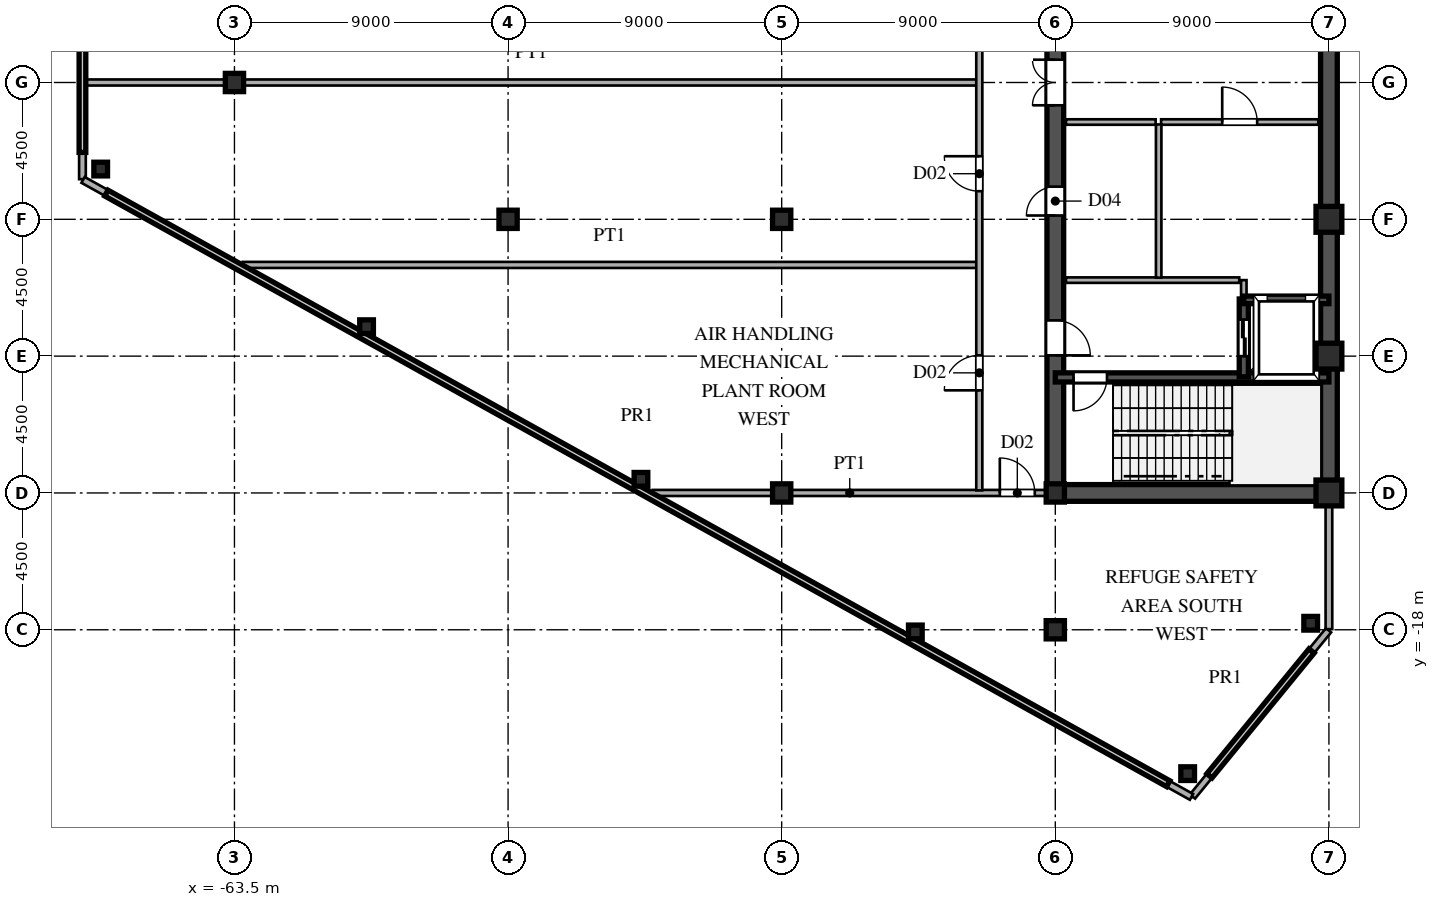
"""IFC4 building model, lengths in metres.
Left out: names, types, materials, properties, quantities, classifications, styles, units other than length and angle.
Written with IfcOpenShell. Run it as: python <this file> out.ifc"""

import sys

from ifc_helpers import new_model, si_unit, direction, frame, frame_2d, origin, origin_2d, place, context, subcontext, project, spatial, rectangle, hollow_rectangle, i_section, extrude, source, transform, mapped, element, fill, save


model = new_model("IFC4")
c1 = context("Model", 3, precision=1e-05, world=origin(), true_north=direction((0.0, 1.0)))
c2 = subcontext(c1, "Body", "Model", "MODEL_VIEW")
j1 = project(units=[si_unit("LENGTHUNIT", "METRE"), si_unit("PLANEANGLEUNIT", "RADIAN")], contexts=[c1])
p1 = place(None, origin())
s1 = spatial("IfcSite", under=j1, at=p1, CompositionType="ELEMENT")
p2 = place(p1, origin())
s2 = spatial("IfcBuilding", under=s1, at=p2, CompositionType="ELEMENT")
p3 = place(p2, frame((0.0, 0.0, 162.0)))
s3 = spatial("IfcBuildingStorey", under=s2, at=p3, CompositionType="ELEMENT", Elevation=162.0)
m1 = source(origin(), c2, "Body", "SweptSolid", [
    extrude(hollow_rectangle(XDim=0.85, YDim=0.85, WallThickness=0.036, at=origin_2d()), origin(), (0.0, 0.0, 1.0), 5.1),
])
for number, where, z_axis, x_axis in (
    (1, (-27.5, -13.5, 0.0), (0.0, 0.0, 1.0), (1.0, 0.0, 0.0)),
    (2, (-27.5, -9.0, 0.0), (0.0, 0.0, 1.0), (1.0, 0.0, 0.0)),
    (3, (-27.5, -4.5, 0.0), (0.0, 0.0, 1.0), (1.0, 0.0, 0.0)),
):
    element("IfcColumn", number, at=place(p3, frame(where, z_axis=z_axis, x_axis=x_axis)), inside=s3, PredefinedType="COLUMN", context=c2, shape_type="MappedRepresentation", body=[
        mapped(m1, transform((0.0, 0.0, 0.0), scale=1.0)),
    ])
m2 = source(origin(), c2, "Body", "SweptSolid", [
    extrude(i_section(OverallWidth=0.6, OverallDepth=0.6, WebThickness=0.025, FlangeThickness=0.04, at=origin_2d()), origin(), (0.0, 0.0, 1.0), 5.1),
])
for number, where, z_axis, x_axis in (
    (4, (-36.5, -18.0, 0.0), (0.0, 0.0, 1.0), (1.0, 0.0, 0.0)),
    (5, (-36.5, -13.5, 0.0), (0.0, 0.0, 1.0), (1.0, 0.0, 0.0)),
    (6, (-45.5, -13.5, 0.0), (0.0, 0.0, 1.0), (1.0, 0.0, 0.0)),
    (7, (-45.5, -4.5, 0.0), (0.0, 0.0, 1.0), (1.0, 0.0, 0.0)),
    (8, (-54.5, -4.5, 0.0), (0.0, 0.0, 1.0), (1.0, 0.0, 0.0)),
    (9, (-63.5, 0.0, 0.0), (0.0, 0.0, 1.0), (1.0, 0.0, 0.0)),
):
    element("IfcColumn", number, at=place(p3, frame(where, z_axis=z_axis, x_axis=x_axis)), inside=s3, PredefinedType="COLUMN", context=c2, shape_type="MappedRepresentation", body=[
        mapped(m2, transform((0.0, 0.0, 0.0), scale=1.0)),
    ])
m3 = source(origin(), c2, "Body", "SweptSolid", [
    extrude(hollow_rectangle(XDim=0.45, YDim=0.45, WallThickness=0.018, at=origin_2d()), origin(), (0.0, 0.0, 1.0), 5.1),
])
for number, where, z_axis, x_axis in (
    (10, (-28.1, -17.786, 0.0), (0.0, 0.0, 1.0), (1.0, 0.0, 0.0)),
    (11, (-67.9, -2.847, 0.0), (0.0, 0.0, 1.0), (1.0, 0.0, 0.0)),
    (12, (-32.147, -22.732, 0.0), (0.0, 0.0, 1.0), (1.0, 0.0, 0.0)),
    (13, (-41.104, -18.071, 0.0), (0.0, 0.0, 1.0), (1.0, 0.0, 0.0)),
    (14, (-50.129, -13.051, 0.0), (0.0, 0.0, 1.0), (1.0, 0.0, 0.0)),
    (15, (-59.155, -8.031, 0.0), (0.0, 0.0, 1.0), (1.0, 0.0, 0.0)),
):
    element("IfcColumn", number, at=place(p3, frame(where, z_axis=z_axis, x_axis=x_axis)), inside=s3, PredefinedType="COLUMN", context=c2, shape_type="MappedRepresentation", body=[
        mapped(m3, transform((0.0, 0.0, 0.0), scale=1.0)),
    ])
p4 = place(p3, frame((-27.5, -17.98, 0.0), z_axis=(0.0, 0.0, 1.0), x_axis=(0.0, 1.0, 0.0)))
e16 = element("IfcWall", 16, at=p4, inside=s3, PredefinedType="PARAPET", context=c2, shape_type="SweptSolid", body=[
    extrude(rectangle(XDim=4.46, YDim=0.22, at=frame_2d((2.23, 0.0))), origin(), (0.0, 0.0, 1.0), 1.25),
])
p5 = place(p3, frame((-68.5, 3.18, 0.0), z_axis=(0.0, 0.0, 1.0), x_axis=(0.0, -1.0, 0.0)))
e17 = element("IfcWall", 17, at=p5, inside=s3, PredefinedType="PARAPET", context=c2, shape_type="SweptSolid", body=[
    extrude(rectangle(XDim=6.36, YDim=0.22, at=frame_2d((3.18, 0.0))), origin(), (0.0, 0.0, 1.0), 1.25),
])
p6 = place(p3, frame((-68.482, -3.21, 0.0), z_axis=(0.0, 0.0, 1.0), x_axis=(0.873930586172, -0.486050748947, 0.0)))
e18 = element("IfcWall", 18, at=p6, inside=s3, PredefinedType="PARAPET", context=c2, shape_type="SweptSolid", body=[
    extrude(rectangle(XDim=41.725, YDim=0.22, at=frame_2d((20.863, 0.0))), origin(), (0.0, 0.0, 1.0), 1.25),
])
p7 = place(p3, frame((-31.987, -23.485, 0.0), z_axis=(0.0, 0.0, 1.0), x_axis=(0.633218976113, 0.773972692213, 0.0)))
e19 = element("IfcWall", 19, at=p7, inside=s3, PredefinedType="PARAPET", context=c2, shape_type="SweptSolid", body=[
    extrude(rectangle(XDim=7.066, YDim=0.22, at=frame_2d((3.533, 0.0))), origin(), (0.0, 0.0, 1.0), 1.25),
])
p8 = place(p3, frame((-27.5, -13.5, 0.0), z_axis=(0.0, 0.0, 1.0), x_axis=(0.0, 1.0, 0.0)))
e20 = element("IfcWall", 20, at=p8, inside=s3, PredefinedType="SHEAR", context=c2, shape_type="SweptSolid", body=[
    extrude(rectangle(XDim=12.2, YDim=0.55, at=frame_2d((6.1, 0.0))), origin(), (0.0, 0.0, 1.0), 4.88),
])
p9 = place(p3, frame((-27.5, -1.3, 0.0), z_axis=(0.0, 0.0, 1.0), x_axis=(0.0, 1.0, 0.0)))
e21 = element("IfcWall", 21, at=p9, inside=s3, PredefinedType="SHEAR", context=c2, shape_type="SweptSolid", body=[
    extrude(rectangle(XDim=2.6, YDim=0.55, at=frame_2d((1.3, 0.0))), origin(), (0.0, 0.0, 1.0), 4.88),
])
p10 = place(p3, frame((-36.5, -13.5, 0.0), z_axis=(0.0, 0.0, 1.0), x_axis=(1.0, 0.0, 0.0)))
e22 = element("IfcWall", 22, at=p10, inside=s3, PredefinedType="SHEAR", context=c2, shape_type="SweptSolid", body=[
    extrude(rectangle(XDim=9.0, YDim=0.55, at=frame_2d((4.5, 0.0))), origin(), (0.0, 0.0, 1.0), 4.88),
])
p11 = place(p3, frame((-36.5, -13.65, 0.0), z_axis=(0.0, 0.0, 1.0), x_axis=(0.0, 1.0, 0.0)))
e23 = element("IfcWall", 23, at=p11, inside=s3, PredefinedType="SHEAR", context=c2, shape_type="SweptSolid", body=[
    extrude(rectangle(XDim=7.15, YDim=0.55, at=frame_2d((3.575, 0.0))), origin(), (0.0, 0.0, 1.0), 4.88),
])
p12 = place(p11, frame((4.675, 0.0, 0.0)))
e24 = element("IfcOpeningElement", 24, at=p12, cuts=e23, PredefinedType="OPENING", context=c2, shape_type="SweptSolid", body=[
    extrude(rectangle(XDim=1.15, YDim=2.2, at=frame_2d((0.575, 1.1))), frame((0.0, 0.285, 0.0), z_axis=(0.0, -1.0, 0.0), x_axis=(1.0, 0.0, 0.0)), (0.0, 0.0, 1.0), 0.57),
])
p13 = place(p3, frame((-36.5, -1.3, 0.0), z_axis=(0.0, 0.0, 1.0), x_axis=(0.0, 1.0, 0.0)))
e25 = element("IfcWall", 25, at=p13, inside=s3, PredefinedType="SHEAR", context=c2, shape_type="SweptSolid", body=[
    extrude(rectangle(XDim=2.6, YDim=0.55, at=frame_2d((1.3, 0.0))), origin(), (0.0, 0.0, 1.0), 4.88),
])
p14 = place(p13, frame((0.55, 0.0, 0.0)))
e26 = element("IfcOpeningElement", 26, at=p14, cuts=e25, PredefinedType="OPENING", context=c2, shape_type="SweptSolid", body=[
    extrude(rectangle(XDim=1.5, YDim=2.3, at=frame_2d((0.75, 1.15))), frame((0.0, 0.285, 0.0), z_axis=(0.0, -1.0, 0.0), x_axis=(1.0, 0.0, 0.0)), (0.0, 0.0, 1.0), 0.57),
])
p15 = place(p3, frame((-36.5, -6.5, 0.0), z_axis=(0.0, 0.0, 1.0), x_axis=(0.0, 1.0, 0.0)))
e27 = element("IfcWall", 27, at=p15, inside=s3, PredefinedType="SHEAR", context=c2, shape_type="SweptSolid", body=[
    extrude(rectangle(XDim=5.2, YDim=0.55, at=frame_2d((2.6, 0.0))), origin(), (0.0, 0.0, 1.0), 4.88),
])
p16 = place(p15, frame((2.125, 0.0, 0.0)))
e28 = element("IfcOpeningElement", 28, at=p16, cuts=e27, PredefinedType="OPENING", context=c2, shape_type="SweptSolid", body=[
    extrude(rectangle(XDim=0.95, YDim=2.15, at=frame_2d((0.475, 1.075))), frame((0.0, 0.285, 0.0), z_axis=(0.0, -1.0, 0.0), x_axis=(1.0, 0.0, 0.0)), (0.0, 0.0, 1.0), 0.57),
])
p17 = place(p3, frame((-36.5, -9.7, 0.0), z_axis=(0.0, 0.0, 1.0), x_axis=(1.0, 0.0, 0.0)))
e29 = element("IfcWall", 29, at=p17, inside=s3, PredefinedType="SHEAR", context=c2, shape_type="SweptSolid", body=[
    extrude(rectangle(XDim=9.0, YDim=0.3, at=frame_2d((4.5, 0.0))), origin(), (0.0, 0.0, 1.0), 4.88),
])
p18 = place(p17, frame((0.6, 0.0, 0.0)))
e30 = element("IfcOpeningElement", 30, at=p18, cuts=e29, PredefinedType="OPENING", context=c2, shape_type="SweptSolid", body=[
    extrude(rectangle(XDim=1.1, YDim=2.2, at=frame_2d((0.55, 1.1))), frame((0.0, 0.16, 0.0), z_axis=(0.0, -1.0, 0.0), x_axis=(1.0, 0.0, 0.0)), (0.0, 0.0, 1.0), 0.32),
])
p19 = place(p3, frame((-30.3, -7.15, 0.0), z_axis=(0.0, 0.0, 1.0), x_axis=(1.0, 0.0, 0.0)))
e31 = element("IfcWall", 31, at=p19, inside=s3, PredefinedType="SHEAR", context=c2, shape_type="SweptSolid", body=[
    extrude(rectangle(XDim=2.8, YDim=0.25, at=frame_2d((1.4, 0.0))), origin(), (0.0, 0.0, 1.0), 4.88),
])
p20 = place(p3, frame((-30.3, -9.68, 0.0), z_axis=(0.0, 0.0, 1.0), x_axis=(0.0, 1.0, 0.0)))
e32 = element("IfcWall", 32, at=p20, inside=s3, PredefinedType="SHEAR", context=c2, shape_type="SweptSolid", body=[
    extrude(rectangle(XDim=2.56, YDim=0.3, at=frame_2d((1.28, 0.0))), origin(), (0.0, 0.0, 1.0), 4.88),
])
p21 = place(p20, frame((0.68, 0.0, 0.0)))
e33 = element("IfcOpeningElement", 33, at=p21, cuts=e32, PredefinedType="OPENING", context=c2, shape_type="SweptSolid", body=[
    extrude(rectangle(XDim=1.2, YDim=2.25, at=frame_2d((0.6, 1.125))), frame((0.0, 0.16, 0.0), z_axis=(0.0, -1.0, 0.0), x_axis=(1.0, 0.0, 0.0)), (0.0, 0.0, 1.0), 0.32),
])
p22 = place(p3, frame((-36.15, -6.5, 0.0), z_axis=(0.0, 0.0, 1.0), x_axis=(1.0, 0.0, 0.0)))
e34 = element("IfcWall", 34, at=p22, inside=s3, PredefinedType="PARTITIONING", context=c2, shape_type="SweptSolid", body=[
    extrude(rectangle(XDim=5.7, YDim=0.18, at=frame_2d((2.85, 0.0))), origin(), (0.0, 0.0, 1.0), 4.88),
])
p23 = place(p3, frame((-30.3, -7.12, 0.0), z_axis=(0.0, 0.0, 1.0), x_axis=(0.0, 1.0, 0.0)))
e35 = element("IfcWall", 35, at=p23, inside=s3, PredefinedType="PARTITIONING", context=c2, shape_type="SweptSolid", body=[
    extrude(rectangle(XDim=0.62, YDim=0.18, at=frame_2d((0.31, 0.0))), origin(), (0.0, 0.0, 1.0), 4.88),
])
p24 = place(p3, frame((-33.1, -6.42, 0.0), z_axis=(0.0, 0.0, 1.0), x_axis=(0.0, 1.0, 0.0)))
e36 = element("IfcWall", 36, at=p24, inside=s3, PredefinedType="PARTITIONING", context=c2, shape_type="SweptSolid", body=[
    extrude(rectangle(XDim=5.04, YDim=0.18, at=frame_2d((2.52, 0.0))), origin(), (0.0, 0.0, 1.0), 4.88),
])
p25 = place(p3, frame((-33.02, -1.3, 0.0), z_axis=(0.0, 0.0, 1.0), x_axis=(1.0, 0.0, 0.0)))
e37 = element("IfcWall", 37, at=p25, inside=s3, PredefinedType="PARTITIONING", context=c2, shape_type="SweptSolid", body=[
    extrude(rectangle(XDim=5.17, YDim=0.18, at=frame_2d((2.585, 0.0))), origin(), (0.0, 0.0, 1.0), 4.88),
])
p26 = place(p25, frame((2.01, 0.0, 0.0)))
e38 = element("IfcOpeningElement", 38, at=p26, cuts=e37, PredefinedType="OPENING", context=c2, shape_type="SweptSolid", body=[
    extrude(rectangle(XDim=1.15, YDim=2.2, at=frame_2d((0.575, 1.1))), frame((0.0, 0.1, 0.0), z_axis=(0.0, -1.0, 0.0), x_axis=(1.0, 0.0, 0.0)), (0.0, 0.0, 1.0), 0.2),
])
p27 = place(p3, frame((-36.15, -1.3, 0.0), z_axis=(0.0, 0.0, 1.0), x_axis=(1.0, 0.0, 0.0)))
e39 = element("IfcWall", 39, at=p27, inside=s3, PredefinedType="PARTITIONING", context=c2, shape_type="SweptSolid", body=[
    extrude(rectangle(XDim=2.95, YDim=0.18, at=frame_2d((1.475, 0.0))), origin(), (0.0, 0.0, 1.0), 4.88),
])
p28 = place(p3, frame((-49.744, -13.5, 0.0), z_axis=(0.0, 0.0, 1.0), x_axis=(1.0, 0.0, 0.0)))
e40 = element("IfcWall", 40, at=p28, inside=s3, PredefinedType="PARTITIONING", context=c2, shape_type="SweptSolid", body=[
    extrude(rectangle(XDim=2.156, YDim=0.2, at=frame_2d((1.078, 0.0))), origin(), (0.0, 0.0, 1.0), 4.88),
])
p29 = place(p3, frame((-47.587, -13.5, 0.0), z_axis=(0.0, 0.0, 1.0), x_axis=(1.0, 0.0, 0.0)))
e41 = element("IfcWall", 41, at=p29, inside=s3, PredefinedType="PARTITIONING", context=c2, shape_type="SweptSolid", body=[
    extrude(rectangle(XDim=10.807, YDim=0.2, at=frame_2d((5.404, 0.0))), origin(), (0.0, 0.0, 1.0), 4.28),
])
p30 = place(p29, frame((9.262, 0.0, 0.0)))
e42 = element("IfcOpeningElement", 42, at=p30, cuts=e41, PredefinedType="OPENING", context=c2, shape_type="SweptSolid", body=[
    extrude(rectangle(XDim=1.15, YDim=2.2, at=frame_2d((0.575, 1.1))), frame((0.0, 0.11, 0.0), z_axis=(0.0, -1.0, 0.0), x_axis=(1.0, 0.0, 0.0)), (0.0, 0.0, 1.0), 0.22),
])
p31 = place(p3, frame((-63.229, -6.0, 0.0), z_axis=(0.0, 0.0, 1.0), x_axis=(1.0, 0.0, 0.0)))
e43 = element("IfcWall", 43, at=p31, inside=s3, PredefinedType="PARTITIONING", context=c2, shape_type="SweptSolid", body=[
    extrude(rectangle(XDim=24.144, YDim=0.2, at=frame_2d((12.072, 0.0))), origin(), (0.0, 0.0, 1.0), 4.88),
])
p32 = place(p3, frame((-68.385, 0.0, 0.0), z_axis=(0.0, 0.0, 1.0), x_axis=(1.0, 0.0, 0.0)))
e44 = element("IfcWall", 44, at=p32, inside=s3, PredefinedType="PARTITIONING", context=c2, shape_type="SweptSolid", body=[
    extrude(rectangle(XDim=29.3, YDim=0.2, at=frame_2d((14.65, 0.0))), origin(), (0.0, 0.0, 1.0), 4.88),
])
p33 = place(p3, frame((-39.0, -13.415, 0.0), z_axis=(0.0, 0.0, 1.0), x_axis=(0.0, 1.0, 0.0)))
e45 = element("IfcWall", 45, at=p33, inside=s3, PredefinedType="PARTITIONING", context=c2, shape_type="SweptSolid", body=[
    extrude(rectangle(XDim=26.83, YDim=0.2, at=frame_2d((13.415, 0.0))), origin(), (0.0, 0.0, 1.0), 4.88),
])
p34 = place(p33, frame((3.29, 0.0, 0.0)))
e46 = element("IfcOpeningElement", 46, at=p34, cuts=e45, PredefinedType="OPENING", context=c2, shape_type="SweptSolid", body=[
    extrude(rectangle(XDim=1.15, YDim=2.2, at=frame_2d((0.575, 1.1))), frame((0.0, 0.11, 0.0), z_axis=(0.0, -1.0, 0.0), x_axis=(1.0, 0.0, 0.0)), (0.0, 0.0, 1.0), 0.22),
])
p35 = place(p33, frame((9.84, 0.0, 0.0)))
e47 = element("IfcOpeningElement", 47, at=p35, cuts=e45, PredefinedType="OPENING", context=c2, shape_type="SweptSolid", body=[
    extrude(rectangle(XDim=1.15, YDim=2.2, at=frame_2d((0.575, 1.1))), frame((0.0, 0.11, 0.0), z_axis=(0.0, -1.0, 0.0), x_axis=(1.0, 0.0, 0.0)), (0.0, 0.0, 1.0), 0.22),
])
p36 = place(p33, frame((16.09, 0.0, 0.0)))
e48 = element("IfcOpeningElement", 48, at=p36, cuts=e45, PredefinedType="OPENING", context=c2, shape_type="SweptSolid", body=[
    extrude(rectangle(XDim=1.15, YDim=2.2, at=frame_2d((0.575, 1.1))), frame((0.0, 0.11, 0.0), z_axis=(0.0, -1.0, 0.0), x_axis=(1.0, 0.0, 0.0)), (0.0, 0.0, 1.0), 0.22),
])
p37 = place(p33, frame((22.64, 0.0, 0.0)))
e49 = element("IfcOpeningElement", 49, at=p37, cuts=e45, PredefinedType="OPENING", context=c2, shape_type="SweptSolid", body=[
    extrude(rectangle(XDim=1.15, YDim=2.2, at=frame_2d((0.575, 1.1))), frame((0.0, 0.11, 0.0), z_axis=(0.0, -1.0, 0.0), x_axis=(1.0, 0.0, 0.0)), (0.0, 0.0, 1.0), 0.22),
])
m4 = source(origin(), c2, "Body", "SweptSolid", [
    extrude(rectangle(XDim=1.15, YDim=2.2, at=frame_2d((0.575, 1.1))), frame((0.0, 0.025, 0.0), z_axis=(0.0, -1.0, 0.0), x_axis=(1.0, 0.0, 0.0)), (0.0, 0.0, 1.0), 0.05),
])
p38 = place(p12, frame((1.15, 0.0, 0.0), z_axis=(0.0, 0.0, 1.0), x_axis=(-1.0, 0.0, 0.0)))
e50 = element("IfcDoor", 50, at=p38, inside=s3, OperationType="SINGLE_SWING_LEFT", PredefinedType="DOOR", context=c2, shape_type="MappedRepresentation", body=[
    mapped(m4, transform((0.0, 0.0, 0.0), scale=1.0)),
])
fill(e24, e50)
m5 = source(origin(), c2, "Body", "SweptSolid", [
    extrude(rectangle(XDim=1.5, YDim=2.3, at=frame_2d((0.75, 1.15))), frame((0.0, 0.025, 0.0), z_axis=(0.0, -1.0, 0.0), x_axis=(1.0, 0.0, 0.0)), (0.0, 0.0, 1.0), 0.05),
])
p39 = place(p14, origin())
e51 = element("IfcDoor", 51, at=p39, inside=s3, OperationType="DOUBLE_SWING_LEFT", PredefinedType="DOOR", context=c2, shape_type="MappedRepresentation", body=[
    mapped(m5, transform((0.0, 0.0, 0.0), scale=1.0)),
])
fill(e26, e51)
m6 = source(origin(), c2, "Body", "SweptSolid", [
    extrude(rectangle(XDim=0.95, YDim=2.15, at=frame_2d((0.475, 1.075))), frame((0.0, 0.025, 0.0), z_axis=(0.0, -1.0, 0.0), x_axis=(1.0, 0.0, 0.0)), (0.0, 0.0, 1.0), 0.05),
])
p40 = place(p16, origin())
e52 = element("IfcDoor", 52, at=p40, inside=s3, OperationType="SINGLE_SWING_LEFT", PredefinedType="DOOR", context=c2, shape_type="MappedRepresentation", body=[
    mapped(m6, transform((0.0, 0.0, 0.0), scale=1.0)),
])
fill(e28, e52)
m7 = source(origin(), c2, "Body", "SweptSolid", [
    extrude(rectangle(XDim=1.1, YDim=2.2, at=frame_2d((0.55, 1.1))), frame((0.0, 0.025, 0.0), z_axis=(0.0, -1.0, 0.0), x_axis=(1.0, 0.0, 0.0)), (0.0, 0.0, 1.0), 0.05),
])
p41 = place(p18, frame((1.1, 0.0, 0.0), z_axis=(0.0, 0.0, 1.0), x_axis=(-1.0, 0.0, 0.0)))
e53 = element("IfcDoor", 53, at=p41, inside=s3, OperationType="SINGLE_SWING_LEFT", PredefinedType="DOOR", context=c2, shape_type="MappedRepresentation", body=[
    mapped(m7, transform((0.0, 0.0, 0.0), scale=1.0)),
])
fill(e30, e53)
m8 = source(origin(), c2, "Body", "SweptSolid", [
    extrude(rectangle(XDim=1.2, YDim=2.25, at=frame_2d((0.6, 1.125))), frame((0.0, 0.025, 0.0), z_axis=(0.0, -1.0, 0.0), x_axis=(1.0, 0.0, 0.0)), (0.0, 0.0, 1.0), 0.05),
])
p42 = place(p21, origin())
e54 = element("IfcDoor", 54, at=p42, inside=s3, OperationType="DOUBLE_DOOR_SLIDING", PredefinedType="DOOR", context=c2, shape_type="MappedRepresentation", body=[
    mapped(m8, transform((0.0, 0.0, 0.0), scale=1.0)),
])
fill(e33, e54)
p43 = place(p26, origin())
e55 = element("IfcDoor", 55, at=p43, inside=s3, OperationType="SINGLE_SWING_LEFT", PredefinedType="DOOR", context=c2, shape_type="MappedRepresentation", body=[
    mapped(m4, transform((0.0, 0.0, 0.0), scale=1.0)),
])
fill(e38, e55)
p44 = place(p30, origin())
e56 = element("IfcDoor", 56, at=p44, inside=s3, OperationType="SINGLE_SWING_LEFT", PredefinedType="DOOR", context=c2, shape_type="MappedRepresentation", body=[
    mapped(m4, transform((0.0, 0.0, 0.0), scale=1.0)),
])
fill(e42, e56)
p45 = place(p34, origin())
e57 = element("IfcDoor", 57, at=p45, inside=s3, OperationType="SINGLE_SWING_LEFT", PredefinedType="DOOR", context=c2, shape_type="MappedRepresentation", body=[
    mapped(m4, transform((0.0, 0.0, 0.0), scale=1.0)),
])
fill(e46, e57)
p46 = place(p35, origin())
e58 = element("IfcDoor", 58, at=p46, inside=s3, OperationType="SINGLE_SWING_RIGHT", PredefinedType="DOOR", context=c2, shape_type="MappedRepresentation", body=[
    mapped(m4, transform((0.0, 0.0, 0.0), scale=1.0)),
])
fill(e47, e58)
save(model, sys.argv[1])
